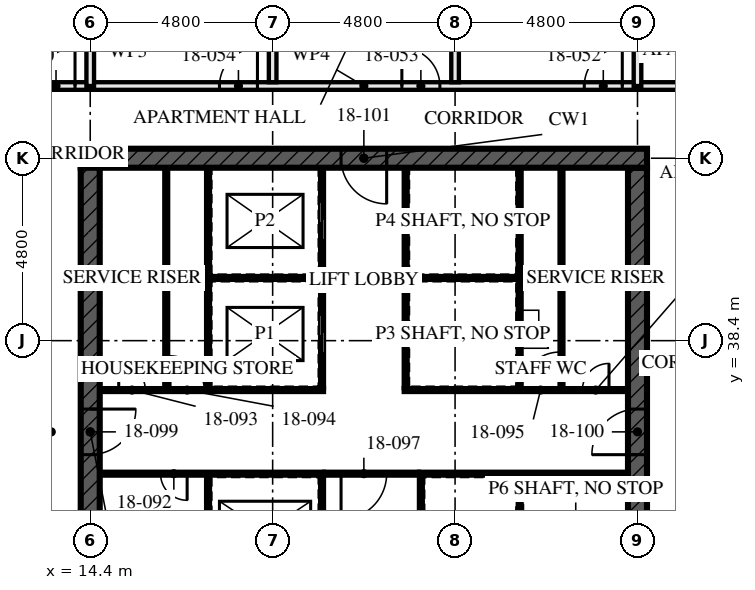
"""IFC4 building model, lengths in metres.
Left out: names, types, materials, properties, quantities, classifications, styles, units other than length and angle.
Written with IfcOpenShell. Run it as: python <this file> out.ifc"""

import sys

from ifc_helpers import new_model, si_unit, direction, frame, frame_2d, origin, place, context, subcontext, project, spatial, rectangle, extrude, element, fill, save


model = new_model("IFC4")
c1 = context("Model", 3, precision=1e-05, world=origin(), true_north=direction((0.0, 1.0)))
c2 = subcontext(c1, "Body", "Model", "MODEL_VIEW")
j1 = project(units=[si_unit("LENGTHUNIT", "METRE"), si_unit("PLANEANGLEUNIT", "RADIAN")], contexts=[c1])
p1 = place(None, origin())
s1 = spatial("IfcSite", under=j1, at=p1, CompositionType="ELEMENT")
p2 = place(p1, origin())
s2 = spatial("IfcBuilding", under=s1, at=p2, CompositionType="ELEMENT")
p3 = place(p2, frame((0.0, 0.0, 69.0)))
s3 = spatial("IfcBuildingStorey", under=s2, at=p3, CompositionType="ELEMENT", Elevation=69.0)
p4 = place(p3, frame((29.05, 43.2, -0.17), z_axis=(0.0, 0.0, 1.0), x_axis=(-1.0, 0.0, 0.0)))
e1 = element("IfcWall", 1, at=p4, inside=s3, PredefinedType="SHEAR", context=c2, shape_type="SweptSolid", body=[
    extrude(rectangle(XDim=14.9, YDim=0.5, at=frame_2d((7.45, 0.0))), origin(), (0.0, 0.0, 1.0), 3.5),
])
p5 = place(p4, frame((6.85, 0.0, 0.17)))
e2 = element("IfcOpeningElement", 2, at=p5, cuts=e1, PredefinedType="OPENING", context=c2, shape_type="SweptSolid", body=[
    extrude(rectangle(XDim=1.2, YDim=2.1, at=frame_2d((0.6, 1.05))), frame((0.0, 0.26, 0.0), z_axis=(0.0, -1.0, 0.0), x_axis=(1.0, 0.0, 0.0)), (0.0, 0.0, 1.0), 0.521),
])
p6 = place(p3, frame((14.4, 42.95, -0.17), z_axis=(0.0, 0.0, 1.0), x_axis=(0.0, -1.0, 0.0)))
e3 = element("IfcWall", 3, at=p6, inside=s3, PredefinedType="SHEAR", context=c2, shape_type="SweptSolid", body=[
    extrude(rectangle(XDim=13.9, YDim=0.5, at=frame_2d((6.95, 0.0))), origin(), (0.0, 0.0, 1.0), 3.5),
])
p7 = place(p6, frame((6.35, 0.0, 0.17)))
e4 = element("IfcOpeningElement", 4, at=p7, cuts=e3, PredefinedType="OPENING", context=c2, shape_type="SweptSolid", body=[
    extrude(rectangle(XDim=1.2, YDim=2.1, at=frame_2d((0.6, 1.05))), frame((0.0, 0.26, 0.0), z_axis=(0.0, -1.0, 0.0), x_axis=(1.0, 0.0, 0.0)), (0.0, 0.0, 1.0), 0.521),
])
p8 = place(p3, frame((28.8, 29.05, -0.17), z_axis=(0.0, 0.0, 1.0), x_axis=(0.0, 1.0, 0.0)))
e5 = element("IfcWall", 5, at=p8, inside=s3, PredefinedType="SHEAR", context=c2, shape_type="SweptSolid", body=[
    extrude(rectangle(XDim=13.9, YDim=0.5, at=frame_2d((6.95, 0.0))), origin(), (0.0, 0.0, 1.0), 3.5),
])
p9 = place(p8, frame((6.35, 0.0, 0.17)))
e6 = element("IfcOpeningElement", 6, at=p9, cuts=e5, PredefinedType="OPENING", context=c2, shape_type="SweptSolid", body=[
    extrude(rectangle(XDim=1.2, YDim=2.1, at=frame_2d((0.6, 1.05))), frame((0.0, 0.26, 0.0), z_axis=(0.0, -1.0, 0.0), x_axis=(1.0, 0.0, 0.0)), (0.0, 0.0, 1.0), 0.521),
])
p10 = place(p3, frame((14.4, 45.1, 0.0), z_axis=(0.0, 0.0, 1.0), x_axis=(-1.0, 0.0, 0.0)))
e7 = element("IfcWall", 7, at=p10, inside=s3, PredefinedType="PARTITIONING", context=c2, shape_type="SweptSolid", body=[
    extrude(rectangle(XDim=9.6, YDim=0.2, at=frame_2d((4.8, 0.0))), origin(), (0.0, 0.0, 1.0), 3.33),
])
p11 = place(p10, frame((0.4, 0.0, 0.0)))
e8 = element("IfcOpeningElement", 8, at=p11, cuts=e7, PredefinedType="OPENING", context=c2, shape_type="SweptSolid", body=[
    extrude(rectangle(XDim=1.0, YDim=2.1, at=frame_2d((0.5, 1.05))), frame((0.0, 0.111, 0.0), z_axis=(0.0, -1.0, 0.0), x_axis=(1.0, 0.0, 0.0)), (0.0, 0.0, 1.0), 0.221),
])
p12 = place(p10, frame((5.2, 0.0, 0.0)))
e9 = element("IfcOpeningElement", 9, at=p12, cuts=e7, PredefinedType="OPENING", context=c2, shape_type="SweptSolid", body=[
    extrude(rectangle(XDim=1.0, YDim=2.1, at=frame_2d((0.5, 1.05))), frame((0.0, 0.111, 0.0), z_axis=(0.0, -1.0, 0.0), x_axis=(1.0, 0.0, 0.0)), (0.0, 0.0, 1.0), 0.221),
])
for number, where, z_axis, x_axis in (
    (10, (24.0, 57.28, 0.0), (0.0, 0.0, 1.0), (0.0, -1.0, 0.0)),
    (11, (19.2, 57.28, 0.0), (0.0, 0.0, 1.0), (0.0, -1.0, 0.0)),
):
    element("IfcWall", number, at=place(p3, frame(where, z_axis=z_axis, x_axis=x_axis)), inside=s3, PredefinedType="PARTITIONING", context=c2, shape_type="SweptSolid", body=[
        extrude(rectangle(XDim=12.08, YDim=0.2, at=frame_2d((6.04, 0.0))), origin(), (0.0, 0.0, 1.0), 2.55),
    ])
p13 = place(p3, frame((28.8, 45.1, 0.0), z_axis=(0.0, 0.0, 1.0), x_axis=(-1.0, 0.0, 0.0)))
e12 = element("IfcWall", 12, at=p13, inside=s3, PredefinedType="PARTITIONING", context=c2, shape_type="SweptSolid", body=[
    extrude(rectangle(XDim=14.4, YDim=0.2, at=frame_2d((7.2, 0.0))), origin(), (0.0, 0.0, 1.0), 3.33),
])
p14 = place(p13, frame((0.4, 0.0, 0.0)))
e13 = element("IfcOpeningElement", 13, at=p14, cuts=e12, PredefinedType="OPENING", context=c2, shape_type="SweptSolid", body=[
    extrude(rectangle(XDim=1.0, YDim=2.1, at=frame_2d((0.5, 1.05))), frame((0.0, 0.111, 0.0), z_axis=(0.0, -1.0, 0.0), x_axis=(1.0, 0.0, 0.0)), (0.0, 0.0, 1.0), 0.221),
])
p15 = place(p13, frame((5.2, 0.0, 0.0)))
e14 = element("IfcOpeningElement", 14, at=p15, cuts=e12, PredefinedType="OPENING", context=c2, shape_type="SweptSolid", body=[
    extrude(rectangle(XDim=1.0, YDim=2.1, at=frame_2d((0.5, 1.05))), frame((0.0, 0.111, 0.0), z_axis=(0.0, -1.0, 0.0), x_axis=(1.0, 0.0, 0.0)), (0.0, 0.0, 1.0), 0.221),
])
p16 = place(p13, frame((10.0, 0.0, 0.0)))
e15 = element("IfcOpeningElement", 15, at=p16, cuts=e12, PredefinedType="OPENING", context=c2, shape_type="SweptSolid", body=[
    extrude(rectangle(XDim=1.0, YDim=2.1, at=frame_2d((0.5, 1.05))), frame((0.0, 0.111, 0.0), z_axis=(0.0, -1.0, 0.0), x_axis=(1.0, 0.0, 0.0)), (0.0, 0.0, 1.0), 0.221),
])
p17 = place(p3, frame((38.4, 45.1, 0.0), z_axis=(0.0, 0.0, 1.0), x_axis=(-1.0, 0.0, 0.0)))
e16 = element("IfcWall", 16, at=p17, inside=s3, PredefinedType="PARTITIONING", context=c2, shape_type="SweptSolid", body=[
    extrude(rectangle(XDim=9.6, YDim=0.2, at=frame_2d((4.8, 0.0))), origin(), (0.0, 0.0, 1.0), 3.33),
])
p18 = place(p17, frame((0.4, 0.0, 0.0)))
e17 = element("IfcOpeningElement", 17, at=p18, cuts=e16, PredefinedType="OPENING", context=c2, shape_type="SweptSolid", body=[
    extrude(rectangle(XDim=1.0, YDim=2.1, at=frame_2d((0.5, 1.05))), frame((0.0, 0.111, 0.0), z_axis=(0.0, -1.0, 0.0), x_axis=(1.0, 0.0, 0.0)), (0.0, 0.0, 1.0), 0.221),
])
p19 = place(p17, frame((5.2, 0.0, 0.0)))
e18 = element("IfcOpeningElement", 18, at=p19, cuts=e16, PredefinedType="OPENING", context=c2, shape_type="SweptSolid", body=[
    extrude(rectangle(XDim=1.0, YDim=2.1, at=frame_2d((0.5, 1.05))), frame((0.0, 0.111, 0.0), z_axis=(0.0, -1.0, 0.0), x_axis=(1.0, 0.0, 0.0)), (0.0, 0.0, 1.0), 0.221),
])
for number, where, z_axis, x_axis in (
    (19, (16.4, 37.15, 0.0), (0.0, 0.0, 1.0), (0.0, 1.0, 0.0)),
    (20, (26.8, 37.15, 0.0), (0.0, 0.0, 1.0), (0.0, 1.0, 0.0)),
):
    element("IfcWall", number, at=place(p3, frame(where, z_axis=z_axis, x_axis=x_axis)), inside=s3, PredefinedType="SOLIDWALL", context=c2, shape_type="SweptSolid", body=[
        extrude(rectangle(XDim=5.8, YDim=0.1, at=frame_2d((2.9, 0.0))), origin(), (0.0, 0.0, 1.0), 3.33),
    ])
p20 = place(p3, frame((20.5, 29.05, 0.0), z_axis=(0.0, 0.0, 1.0), x_axis=(0.0, 1.0, 0.0)))
e21 = element("IfcWall", 21, at=p20, inside=s3, PredefinedType="SOLIDWALL", context=c2, shape_type="SweptSolid", body=[
    extrude(rectangle(XDim=5.8, YDim=0.1, at=frame_2d((2.9, 0.0))), origin(), (0.0, 0.0, 1.0), 3.33),
])
p21 = place(p20, frame((0.8, 0.0, 0.0)))
e22 = element("IfcOpeningElement", 22, at=p21, cuts=e21, PredefinedType="OPENING", context=c2, shape_type="SweptSolid", body=[
    extrude(rectangle(XDim=1.1, YDim=2.3, at=frame_2d((0.55, 1.15))), frame((0.0, 0.061, 0.0), z_axis=(0.0, -1.0, 0.0), x_axis=(1.0, 0.0, 0.0)), (0.0, 0.0, 1.0), 0.121),
])
p22 = place(p20, frame((3.775, 0.0, 0.0)))
e23 = element("IfcOpeningElement", 23, at=p22, cuts=e21, PredefinedType="OPENING", context=c2, shape_type="SweptSolid", body=[
    extrude(rectangle(XDim=1.1, YDim=2.3, at=frame_2d((0.55, 1.15))), frame((0.0, 0.061, 0.0), z_axis=(0.0, -1.0, 0.0), x_axis=(1.0, 0.0, 0.0)), (0.0, 0.0, 1.0), 0.121),
])
p23 = place(p3, frame((20.5, 37.15, 0.0), z_axis=(0.0, 0.0, 1.0), x_axis=(0.0, 1.0, 0.0)))
e24 = element("IfcWall", 24, at=p23, inside=s3, PredefinedType="SOLIDWALL", context=c2, shape_type="SweptSolid", body=[
    extrude(rectangle(XDim=5.8, YDim=0.1, at=frame_2d((2.9, 0.0))), origin(), (0.0, 0.0, 1.0), 3.33),
])
p24 = place(p23, frame((0.925, 0.0, 0.0)))
e25 = element("IfcOpeningElement", 25, at=p24, cuts=e24, PredefinedType="OPENING", context=c2, shape_type="SweptSolid", body=[
    extrude(rectangle(XDim=1.0, YDim=2.1, at=frame_2d((0.5, 1.05))), frame((0.0, 0.061, 0.0), z_axis=(0.0, -1.0, 0.0), x_axis=(1.0, 0.0, 0.0)), (0.0, 0.0, 1.0), 0.121),
])
p25 = place(p23, frame((3.9, 0.0, 0.0)))
e26 = element("IfcOpeningElement", 26, at=p25, cuts=e24, PredefinedType="OPENING", context=c2, shape_type="SweptSolid", body=[
    extrude(rectangle(XDim=1.0, YDim=2.1, at=frame_2d((0.5, 1.05))), frame((0.0, 0.061, 0.0), z_axis=(0.0, -1.0, 0.0), x_axis=(1.0, 0.0, 0.0)), (0.0, 0.0, 1.0), 0.121),
])
p26 = place(p3, frame((22.7, 37.15, 0.0), z_axis=(0.0, 0.0, 1.0), x_axis=(0.0, 1.0, 0.0)))
e27 = element("IfcWall", 27, at=p26, inside=s3, PredefinedType="SOLIDWALL", context=c2, shape_type="SweptSolid", body=[
    extrude(rectangle(XDim=5.8, YDim=0.1, at=frame_2d((2.9, 0.0))), origin(), (0.0, 0.0, 1.0), 3.33),
])
p27 = place(p3, frame((23.1, 29.05, 0.0), z_axis=(0.0, 0.0, 1.0), x_axis=(0.0, 1.0, 0.0)))
e28 = element("IfcWall", 28, at=p27, inside=s3, PredefinedType="SOLIDWALL", context=c2, shape_type="SweptSolid", body=[
    extrude(rectangle(XDim=5.8, YDim=0.1, at=frame_2d((2.9, 0.0))), origin(), (0.0, 0.0, 1.0), 3.33),
])
p28 = place(p27, frame((1.0, 0.0, 0.0)))
e29 = element("IfcOpeningElement", 29, at=p28, cuts=e28, PredefinedType="OPENING", context=c2, shape_type="SweptSolid", body=[
    extrude(rectangle(XDim=0.7, YDim=2.1, at=frame_2d((0.35, 1.05))), frame((0.0, 0.061, 0.0), z_axis=(0.0, -1.0, 0.0), x_axis=(1.0, 0.0, 0.0)), (0.0, 0.0, 1.0), 0.121),
])
p29 = place(p3, frame((14.65, 34.9, 0.0), z_axis=(0.0, 0.0, 1.0), x_axis=(1.0, 0.0, 0.0)))
e30 = element("IfcWall", 30, at=p29, inside=s3, PredefinedType="SOLIDWALL", context=c2, shape_type="SweptSolid", body=[
    extrude(rectangle(XDim=5.9, YDim=0.1, at=frame_2d((2.95, 0.0))), origin(), (0.0, 0.0, 1.0), 3.33),
])
p30 = place(p29, frame((1.6, 0.0, 0.0)))
e31 = element("IfcOpeningElement", 31, at=p30, cuts=e30, PredefinedType="OPENING", context=c2, shape_type="SweptSolid", body=[
    extrude(rectangle(XDim=0.7, YDim=2.1, at=frame_2d((0.35, 1.05))), frame((0.0, 0.061, 0.0), z_axis=(0.0, -1.0, 0.0), x_axis=(1.0, 0.0, 0.0)), (0.0, 0.0, 1.0), 0.121),
])
p31 = place(p3, frame((23.05, 34.9, 0.0), z_axis=(0.0, 0.0, 1.0), x_axis=(1.0, 0.0, 0.0)))
e32 = element("IfcWall", 32, at=p31, inside=s3, PredefinedType="SOLIDWALL", context=c2, shape_type="SweptSolid", body=[
    extrude(rectangle(XDim=5.5, YDim=0.1, at=frame_2d((2.75, 0.0))), origin(), (0.0, 0.0, 1.0), 3.33),
])
p32 = place(p3, frame((14.65, 37.1, 0.0), z_axis=(0.0, 0.0, 1.0), x_axis=(1.0, 0.0, 0.0)))
e33 = element("IfcWall", 33, at=p32, inside=s3, PredefinedType="SOLIDWALL", context=c2, shape_type="SweptSolid", body=[
    extrude(rectangle(XDim=5.9, YDim=0.1, at=frame_2d((2.95, 0.0))), origin(), (0.0, 0.0, 1.0), 3.33),
])
p33 = place(p32, frame((0.5, 0.0, 0.0)))
e34 = element("IfcOpeningElement", 34, at=p33, cuts=e33, PredefinedType="OPENING", context=c2, shape_type="SweptSolid", body=[
    extrude(rectangle(XDim=0.7, YDim=2.1, at=frame_2d((0.35, 1.05))), frame((0.0, 0.061, 0.0), z_axis=(0.0, -1.0, 0.0), x_axis=(1.0, 0.0, 0.0)), (0.0, 0.0, 1.0), 0.121),
])
p34 = place(p32, frame((1.85, 0.0, 0.0)))
e35 = element("IfcOpeningElement", 35, at=p34, cuts=e33, PredefinedType="OPENING", context=c2, shape_type="SweptSolid", body=[
    extrude(rectangle(XDim=0.9, YDim=2.1, at=frame_2d((0.45, 1.05))), frame((0.0, 0.061, 0.0), z_axis=(0.0, -1.0, 0.0), x_axis=(1.0, 0.0, 0.0)), (0.0, 0.0, 1.0), 0.121),
])
p35 = place(p3, frame((22.65, 37.1, 0.0), z_axis=(0.0, 0.0, 1.0), x_axis=(1.0, 0.0, 0.0)))
e36 = element("IfcWall", 36, at=p35, inside=s3, PredefinedType="SOLIDWALL", context=c2, shape_type="SweptSolid", body=[
    extrude(rectangle(XDim=5.9, YDim=0.1, at=frame_2d((2.95, 0.0))), origin(), (0.0, 0.0, 1.0), 3.33),
])
p36 = place(p35, frame((3.1, 0.0, 0.0)))
e37 = element("IfcOpeningElement", 37, at=p36, cuts=e36, PredefinedType="OPENING", context=c2, shape_type="SweptSolid", body=[
    extrude(rectangle(XDim=1.0, YDim=2.1, at=frame_2d((0.5, 1.05))), frame((0.0, 0.061, 0.0), z_axis=(0.0, -1.0, 0.0), x_axis=(1.0, 0.0, 0.0)), (0.0, 0.0, 1.0), 0.121),
])
p37 = place(p35, frame((4.7, 0.0, 0.0)))
e38 = element("IfcOpeningElement", 38, at=p37, cuts=e36, PredefinedType="OPENING", context=c2, shape_type="SweptSolid", body=[
    extrude(rectangle(XDim=0.7, YDim=2.1, at=frame_2d((0.35, 1.05))), frame((0.0, 0.061, 0.0), z_axis=(0.0, -1.0, 0.0), x_axis=(1.0, 0.0, 0.0)), (0.0, 0.0, 1.0), 0.121),
])
p38 = place(p3, frame((20.55, 34.9, 0.0), z_axis=(0.0, 0.0, 1.0), x_axis=(1.0, 0.0, 0.0)))
e39 = element("IfcWall", 39, at=p38, inside=s3, PredefinedType="SOLIDWALL", context=c2, shape_type="SweptSolid", body=[
    extrude(rectangle(XDim=2.5, YDim=0.1, at=frame_2d((1.25, 0.0))), origin(), (0.0, 0.0, 1.0), 3.33),
])
p39 = place(p38, frame((0.45, 0.0, 0.0)))
e40 = element("IfcOpeningElement", 40, at=p39, cuts=e39, PredefinedType="OPENING", context=c2, shape_type="SweptSolid", body=[
    extrude(rectangle(XDim=1.2, YDim=2.1, at=frame_2d((0.6, 1.05))), frame((0.0, 0.061, 0.0), z_axis=(0.0, -1.0, 0.0), x_axis=(1.0, 0.0, 0.0)), (0.0, 0.0, 1.0), 0.121),
])
for number, where, z_axis, x_axis in (
    (41, (17.5, 29.05, 0.0), (0.0, 0.0, 1.0), (0.0, 1.0, 0.0)),
    (42, (17.5, 37.15, 0.0), (0.0, 0.0, 1.0), (0.0, 1.0, 0.0)),
):
    element("IfcWall", number, at=place(p3, frame(where, z_axis=z_axis, x_axis=x_axis)), inside=s3, PredefinedType="SOLIDWALL", context=c2, shape_type="SweptSolid", body=[
        extrude(rectangle(XDim=5.8, YDim=0.1, at=frame_2d((2.9, 0.0))), origin(), (0.0, 0.0, 1.0), 3.33),
    ])
for number, where, z_axis, x_axis in (
    (43, (17.55, 40.05, 0.0), (0.0, 0.0, 1.0), (1.0, 0.0, 0.0)),
    (44, (22.75, 40.05, 0.0), (0.0, 0.0, 1.0), (1.0, 0.0, 0.0)),
):
    element("IfcWall", number, at=place(p3, frame(where, z_axis=z_axis, x_axis=x_axis)), inside=s3, PredefinedType="SOLIDWALL", context=c2, shape_type="SweptSolid", body=[
        extrude(rectangle(XDim=2.9, YDim=0.1, at=frame_2d((1.45, 0.0))), origin(), (0.0, 0.0, 1.0), 3.33),
    ])
p40 = place(p3, frame((25.7, 37.15, 0.0), z_axis=(0.0, 0.0, 1.0), x_axis=(0.0, 1.0, 0.0)))
e45 = element("IfcWall", 45, at=p40, inside=s3, PredefinedType="SOLIDWALL", context=c2, shape_type="SweptSolid", body=[
    extrude(rectangle(XDim=5.8, YDim=0.1, at=frame_2d((2.9, 0.0))), origin(), (0.0, 0.0, 1.0), 3.33),
])
p41 = place(p3, frame((25.7, 31.95, 0.0), z_axis=(0.0, 0.0, 1.0), x_axis=(0.0, 1.0, 0.0)))
e46 = element("IfcWall", 46, at=p41, inside=s3, PredefinedType="SOLIDWALL", context=c2, shape_type="SweptSolid", body=[
    extrude(rectangle(XDim=2.9, YDim=0.1, at=frame_2d((1.45, 0.0))), origin(), (0.0, 0.0, 1.0), 3.33),
])
for number, where, z_axis, x_axis in (
    (47, (14.4, 45.1, 0.0), (0.0, 0.0, 1.0), (0.0, 1.0, 0.0)),
    (48, (28.8, 45.1, 0.0), (0.0, 0.0, 1.0), (0.0, 1.0, 0.0)),
):
    element("IfcWall", number, at=place(p3, frame(where, z_axis=z_axis, x_axis=x_axis)), inside=s3, PredefinedType="PARTITIONING", context=c2, shape_type="SweptSolid", body=[
        extrude(rectangle(XDim=2.555, YDim=0.2, at=frame_2d((1.277, 0.0))), origin(), (0.0, 0.0, 1.0), 2.32),
    ])
p42 = place(p11, frame((1.0, 0.0, 0.0), z_axis=(0.0, 0.0, 1.0), x_axis=(-1.0, 0.0, 0.0)))
e49 = element("IfcDoor", 49, at=p42, inside=s3, OperationType="SINGLE_SWING_LEFT", PredefinedType="DOOR", context=c2, shape_type="SweptSolid", body=[
    extrude(rectangle(XDim=1.0, YDim=2.1, at=frame_2d((0.5, 1.05))), frame((0.0, 0.027, 0.0), z_axis=(0.0, -1.0, 0.0), x_axis=(1.0, 0.0, 0.0)), (0.0, 0.0, 1.0), 0.054),
])
fill(e8, e49)
p43 = place(p14, frame((1.0, 0.0, 0.0), z_axis=(0.0, 0.0, 1.0), x_axis=(-1.0, 0.0, 0.0)))
e50 = element("IfcDoor", 50, at=p43, inside=s3, OperationType="SINGLE_SWING_LEFT", PredefinedType="DOOR", context=c2, shape_type="SweptSolid", body=[
    extrude(rectangle(XDim=1.0, YDim=2.1, at=frame_2d((0.5, 1.05))), frame((0.0, 0.027, 0.0), z_axis=(0.0, -1.0, 0.0), x_axis=(1.0, 0.0, 0.0)), (0.0, 0.0, 1.0), 0.054),
])
fill(e13, e50)
p44 = place(p15, frame((1.0, 0.0, 0.0), z_axis=(0.0, 0.0, 1.0), x_axis=(-1.0, 0.0, 0.0)))
e51 = element("IfcDoor", 51, at=p44, inside=s3, OperationType="SINGLE_SWING_RIGHT", PredefinedType="DOOR", context=c2, shape_type="SweptSolid", body=[
    extrude(rectangle(XDim=1.0, YDim=2.1, at=frame_2d((0.5, 1.05))), frame((0.0, 0.027, 0.0), z_axis=(0.0, -1.0, 0.0), x_axis=(1.0, 0.0, 0.0)), (0.0, 0.0, 1.0), 0.054),
])
fill(e14, e51)
p45 = place(p16, frame((1.0, 0.0, 0.0), z_axis=(0.0, 0.0, 1.0), x_axis=(-1.0, 0.0, 0.0)))
e52 = element("IfcDoor", 52, at=p45, inside=s3, OperationType="SINGLE_SWING_LEFT", PredefinedType="DOOR", context=c2, shape_type="SweptSolid", body=[
    extrude(rectangle(XDim=1.0, YDim=2.1, at=frame_2d((0.5, 1.05))), frame((0.0, 0.027, 0.0), z_axis=(0.0, -1.0, 0.0), x_axis=(1.0, 0.0, 0.0)), (0.0, 0.0, 1.0), 0.054),
])
fill(e15, e52)
p46 = place(p24, origin())
e53 = element("IfcDoor", 53, at=p46, inside=s3, OperationType="SLIDING_TO_LEFT", PredefinedType="DOOR", context=c2, shape_type="SweptSolid", body=[
    extrude(rectangle(XDim=1.0, YDim=2.1, at=frame_2d((0.5, 1.05))), frame((0.0, 0.05, 0.0), z_axis=(0.0, -1.0, 0.0), x_axis=(1.0, 0.0, 0.0)), (0.0, 0.0, 1.0), 0.1),
])
fill(e25, e53)
p47 = place(p25, origin())
e54 = element("IfcDoor", 54, at=p47, inside=s3, OperationType="SLIDING_TO_LEFT", PredefinedType="DOOR", context=c2, shape_type="SweptSolid", body=[
    extrude(rectangle(XDim=1.0, YDim=2.1, at=frame_2d((0.5, 1.05))), frame((0.0, 0.05, 0.0), z_axis=(0.0, -1.0, 0.0), x_axis=(1.0, 0.0, 0.0)), (0.0, 0.0, 1.0), 0.1),
])
fill(e26, e54)
p48 = place(p30, frame((0.7, 0.0, 0.0), z_axis=(0.0, 0.0, 1.0), x_axis=(-1.0, 0.0, 0.0)))
e55 = element("IfcDoor", 55, at=p48, inside=s3, OperationType="SINGLE_SWING_RIGHT", PredefinedType="DOOR", context=c2, shape_type="SweptSolid", body=[
    extrude(rectangle(XDim=0.7, YDim=2.1, at=frame_2d((0.35, 1.05))), frame((0.0, 0.027, 0.0), z_axis=(0.0, -1.0, 0.0), x_axis=(1.0, 0.0, 0.0)), (0.0, 0.0, 1.0), 0.054),
])
fill(e31, e55)
p49 = place(p33, origin())
e56 = element("IfcDoor", 56, at=p49, inside=s3, OperationType="SINGLE_SWING_RIGHT", PredefinedType="DOOR", context=c2, shape_type="SweptSolid", body=[
    extrude(rectangle(XDim=0.7, YDim=2.1, at=frame_2d((0.35, 1.05))), frame((0.0, 0.027, 0.0), z_axis=(0.0, -1.0, 0.0), x_axis=(1.0, 0.0, 0.0)), (0.0, 0.0, 1.0), 0.054),
])
fill(e34, e56)
p50 = place(p34, origin())
e57 = element("IfcDoor", 57, at=p50, inside=s3, OperationType="SINGLE_SWING_RIGHT", PredefinedType="DOOR", context=c2, shape_type="SweptSolid", body=[
    extrude(rectangle(XDim=0.9, YDim=2.1, at=frame_2d((0.45, 1.05))), frame((0.0, 0.027, 0.0), z_axis=(0.0, -1.0, 0.0), x_axis=(1.0, 0.0, 0.0)), (0.0, 0.0, 1.0), 0.054),
])
fill(e35, e57)
p51 = place(p36, origin())
e58 = element("IfcDoor", 58, at=p51, inside=s3, OperationType="SINGLE_SWING_LEFT", PredefinedType="DOOR", context=c2, shape_type="SweptSolid", body=[
    extrude(rectangle(XDim=1.0, YDim=2.1, at=frame_2d((0.5, 1.05))), frame((0.0, 0.027, 0.0), z_axis=(0.0, -1.0, 0.0), x_axis=(1.0, 0.0, 0.0)), (0.0, 0.0, 1.0), 0.054),
])
fill(e37, e58)
p52 = place(p37, origin())
e59 = element("IfcDoor", 59, at=p52, inside=s3, OperationType="SINGLE_SWING_LEFT", PredefinedType="DOOR", context=c2, shape_type="SweptSolid", body=[
    extrude(rectangle(XDim=0.7, YDim=2.1, at=frame_2d((0.35, 1.05))), frame((0.0, 0.027, 0.0), z_axis=(0.0, -1.0, 0.0), x_axis=(1.0, 0.0, 0.0)), (0.0, 0.0, 1.0), 0.054),
])
fill(e38, e59)
p53 = place(p39, frame((1.2, 0.0, 0.0), z_axis=(0.0, 0.0, 1.0), x_axis=(-1.0, 0.0, 0.0)))
e60 = element("IfcDoor", 60, at=p53, inside=s3, OperationType="SINGLE_SWING_LEFT", PredefinedType="DOOR", context=c2, shape_type="SweptSolid", body=[
    extrude(rectangle(XDim=1.2, YDim=2.1, at=frame_2d((0.6, 1.05))), frame((0.0, 0.027, 0.0), z_axis=(0.0, -1.0, 0.0), x_axis=(1.0, 0.0, 0.0)), (0.0, 0.0, 1.0), 0.054),
])
fill(e40, e60)
p54 = place(p7, origin())
e61 = element("IfcDoor", 61, at=p54, inside=s3, OperationType="SINGLE_SWING_LEFT", PredefinedType="DOOR", context=c2, shape_type="SweptSolid", body=[
    extrude(rectangle(XDim=1.2, YDim=2.1, at=frame_2d((0.6, 1.05))), frame((0.0, 0.027, 0.0), z_axis=(0.0, -1.0, 0.0), x_axis=(1.0, 0.0, 0.0)), (0.0, 0.0, 1.0), 0.054),
])
fill(e4, e61)
p55 = place(p9, origin())
e62 = element("IfcDoor", 62, at=p55, inside=s3, OperationType="SINGLE_SWING_LEFT", PredefinedType="DOOR", context=c2, shape_type="SweptSolid", body=[
    extrude(rectangle(XDim=1.2, YDim=2.1, at=frame_2d((0.6, 1.05))), frame((0.0, 0.027, 0.0), z_axis=(0.0, -1.0, 0.0), x_axis=(1.0, 0.0, 0.0)), (0.0, 0.0, 1.0), 0.054),
])
fill(e6, e62)
p56 = place(p5, origin())
e63 = element("IfcDoor", 63, at=p56, inside=s3, OperationType="SINGLE_SWING_LEFT", PredefinedType="DOOR", context=c2, shape_type="SweptSolid", body=[
    extrude(rectangle(XDim=1.2, YDim=2.1, at=frame_2d((0.6, 1.05))), frame((0.0, 0.027, 0.0), z_axis=(0.0, -1.0, 0.0), x_axis=(1.0, 0.0, 0.0)), (0.0, 0.0, 1.0), 0.054),
])
fill(e2, e63)
save(model, sys.argv[1])
